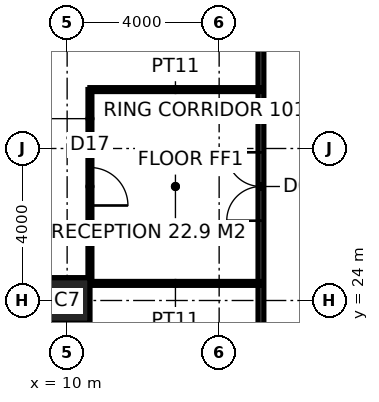
"""IFC4 building model, lengths in metres.
Left out: names, types, materials, properties, quantities, classifications, styles, units other than length and angle.
Written with IfcOpenShell. Run it as: python <this file> out.ifc"""

import sys

from ifc_helpers import new_model, si_unit, direction, frame, frame_2d, origin, origin_2d, place, context, subcontext, project, spatial, rectangle, hollow_rectangle, extrude, element, fill, save


model = new_model("IFC4")
c1 = context("Model", 3, precision=1e-05, world=origin(), true_north=direction((0.0, 1.0)))
c2 = subcontext(c1, "Body", "Model", "MODEL_VIEW")
j1 = project(units=[si_unit("LENGTHUNIT", "METRE"), si_unit("PLANEANGLEUNIT", "RADIAN")], contexts=[c1])
p1 = place(None, origin())
s1 = spatial("IfcSite", under=j1, at=p1, CompositionType="ELEMENT")
p2 = place(p1, origin())
s2 = spatial("IfcBuilding", under=s1, at=p2, CompositionType="ELEMENT")
p3 = place(p2, frame((0.0, 0.0, 47.0)))
s3 = spatial("IfcBuildingStorey", under=s2, at=p3, CompositionType="ELEMENT", Elevation=47.0)
p4 = place(p3, frame((10.0, 24.0, 0.0), z_axis=(0.0, 0.0, 1.0), x_axis=(1.0, 0.0, 0.0)))
e1 = element("IfcColumn", 1, at=p4, inside=s3, PredefinedType="COLUMN", context=c2, shape_type="SweptSolid", body=[
    extrude(hollow_rectangle(XDim=1.2, YDim=1.2, WallThickness=0.1, at=origin_2d()), origin(), (0.0, 0.0, 1.0), 4.0),
])
p5 = place(p3, frame((15.1, 15.225, 0.0), z_axis=(0.0, 0.0, 1.0), x_axis=(0.0, 1.0, 0.0)))
e2 = element("IfcWall", 2, at=p5, inside=s3, PredefinedType="PARTITIONING", context=c2, shape_type="SweptSolid", body=[
    extrude(rectangle(XDim=23.55, YDim=0.15, at=frame_2d((11.775, 0.0))), origin(), (0.0, 0.0, 1.0), 3.85),
])
p6 = place(p5, frame((10.875, 0.0, 0.0)))
e3 = element("IfcOpeningElement", 3, at=p6, cuts=e2, PredefinedType="OPENING", context=c2, shape_type="SweptSolid", body=[
    extrude(rectangle(XDim=1.8, YDim=2.4, at=frame_2d((0.9, 1.2))), frame((0.0, 0.085, 0.0), z_axis=(0.0, -1.0, 0.0), x_axis=(1.0, 0.0, 0.0)), (0.0, 0.0, 1.0), 0.17),
])
p7 = place(p3, frame((15.1, 29.55, 0.0), z_axis=(0.0, 0.0, 1.0), x_axis=(-1.0, 0.0, 0.0)))
e4 = element("IfcWall", 4, at=p7, inside=s3, PredefinedType="PARTITIONING", context=c2, shape_type="SweptSolid", body=[
    extrude(rectangle(XDim=4.5, YDim=0.1, at=frame_2d((2.25, 0.0))), origin(), (0.0, 0.0, 1.0), 3.85),
])
p8 = place(p3, frame((10.6, 29.55, 0.0), z_axis=(0.0, 0.0, 1.0), x_axis=(0.0, -1.0, 0.0)))
e5 = element("IfcWall", 5, at=p8, inside=s3, PredefinedType="PARTITIONING", context=c2, shape_type="SweptSolid", body=[
    extrude(rectangle(XDim=5.1, YDim=0.1, at=frame_2d((2.55, 0.0))), origin(), (0.0, 0.0, 1.0), 3.85),
])
p9 = place(p8, frame((2.05, 0.0, 0.0)))
e6 = element("IfcOpeningElement", 6, at=p9, cuts=e5, PredefinedType="OPENING", context=c2, shape_type="SweptSolid", body=[
    extrude(rectangle(XDim=1.0, YDim=2.2, at=frame_2d((0.5, 1.1))), frame((0.0, 0.06, 0.0), z_axis=(0.0, -1.0, 0.0), x_axis=(1.0, 0.0, 0.0)), (0.0, 0.0, 1.0), 0.12),
])
p10 = place(p3, frame((10.6, 24.45, 0.0), z_axis=(0.0, 0.0, 1.0), x_axis=(1.0, 0.0, 0.0)))
e7 = element("IfcWall", 7, at=p10, inside=s3, PredefinedType="PARTITIONING", context=c2, shape_type="SweptSolid", body=[
    extrude(rectangle(XDim=4.5, YDim=0.1, at=frame_2d((2.25, 0.0))), origin(), (0.0, 0.0, 1.0), 2.95),
])
p11 = place(p6, origin())
e8 = element("IfcDoor", 8, at=p11, inside=s3, OperationType="DOUBLE_DOOR_DOUBLE_SWING", PredefinedType="DOOR", context=c2, shape_type="SweptSolid", body=[
    extrude(rectangle(XDim=1.8, YDim=2.4, at=frame_2d((0.9, 1.2))), frame((0.0, 0.025, 0.0), z_axis=(0.0, -1.0, 0.0), x_axis=(1.0, 0.0, 0.0)), (0.0, 0.0, 1.0), 0.05),
])
fill(e3, e8)
p12 = place(p9, origin())
e9 = element("IfcDoor", 9, at=p12, inside=s3, OperationType="SINGLE_SWING_RIGHT", PredefinedType="DOOR", context=c2, shape_type="SweptSolid", body=[
    extrude(rectangle(XDim=1.0, YDim=2.2, at=frame_2d((0.5, 1.1))), frame((0.0, 0.025, 0.0), z_axis=(0.0, -1.0, 0.0), x_axis=(1.0, 0.0, 0.0)), (0.0, 0.0, 1.0), 0.05),
])
fill(e6, e9)
save(model, sys.argv[1])
